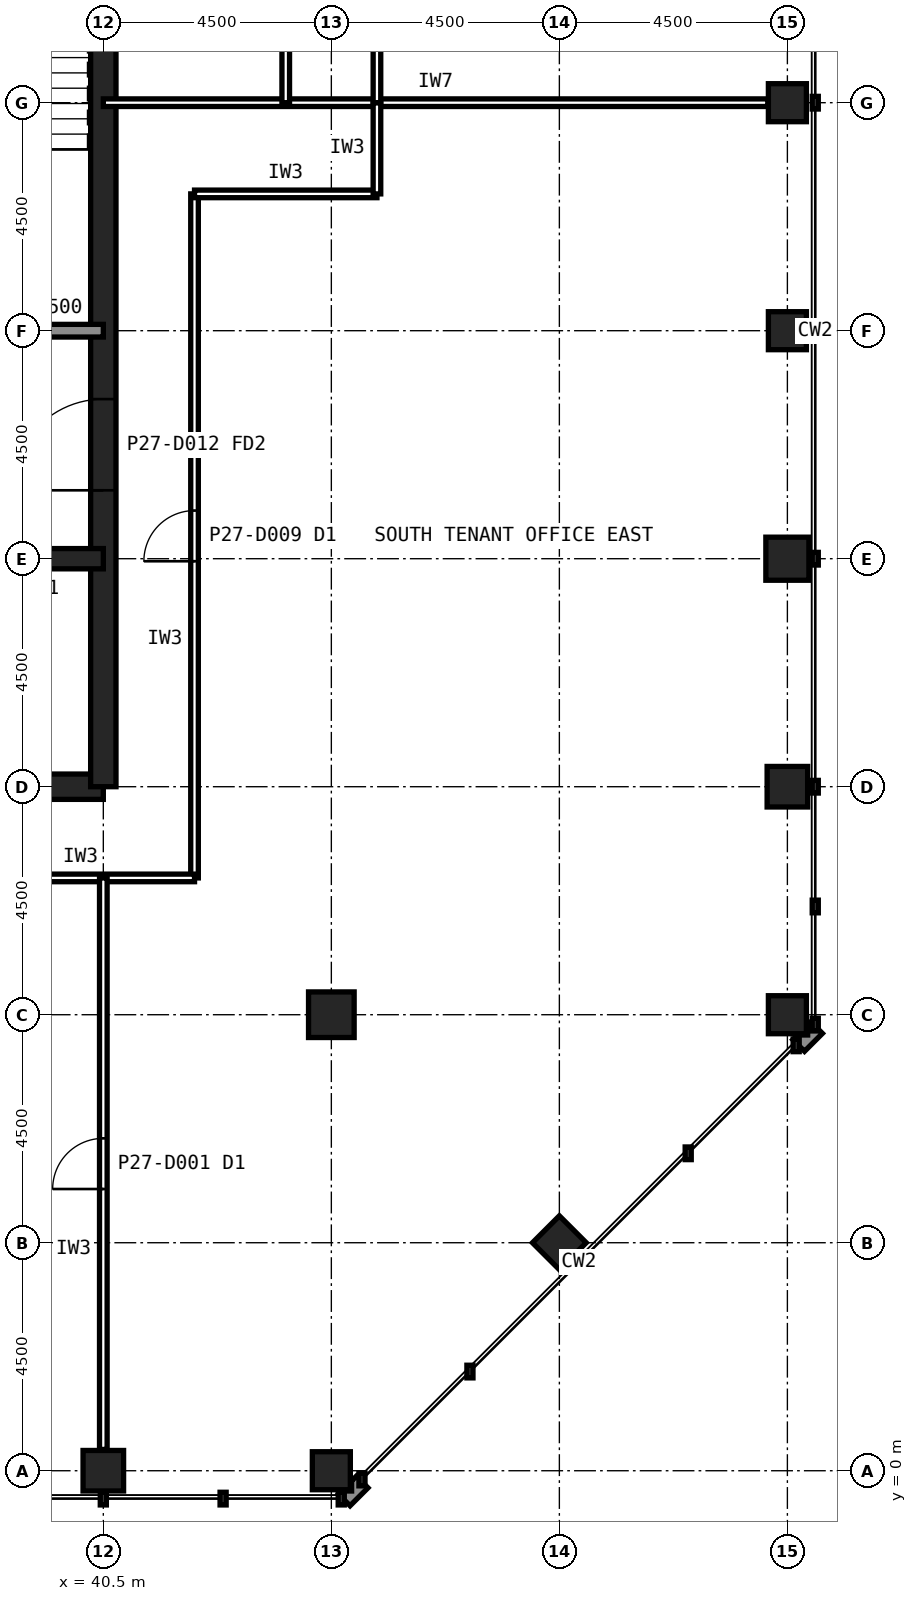
"""IFC4 building model, lengths in metres.
Left out: names, types, materials, properties, quantities, classifications, styles, units other than length and angle.
Written with IfcOpenShell. Run it as: python <this file> out.ifc"""

import sys

from ifc_helpers import new_model, si_unit, direction, frame, frame_2d, origin, origin_2d, place, context, subcontext, project, spatial, rectangle, hollow_rectangle, extrude, element, fill, save


model = new_model("IFC4")
c1 = context("Model", 3, precision=1e-05, world=origin(), true_north=direction((0.0, 1.0)))
c2 = subcontext(c1, "Body", "Model", "MODEL_VIEW")
j1 = project(units=[si_unit("LENGTHUNIT", "METRE"), si_unit("PLANEANGLEUNIT", "RADIAN")], contexts=[c1])
p1 = place(None, origin())
s1 = spatial("IfcSite", under=j1, at=p1, CompositionType="ELEMENT")
p2 = place(p1, origin())
s2 = spatial("IfcBuilding", under=s1, at=p2, CompositionType="ELEMENT")
p3 = place(p2, frame((0.0, 0.0, 119.6)))
s3 = spatial("IfcBuildingStorey", under=s2, at=p3, CompositionType="ELEMENT", Elevation=119.6)
p4 = place(p3, frame((40.5, 0.0, 0.0), z_axis=(0.0, 0.0, 1.0), x_axis=(1.0, 0.0, 0.0)))
e1 = element("IfcColumn", 1, at=p4, inside=s3, PredefinedType="COLUMN", context=c2, shape_type="SweptSolid", body=[
    extrude(hollow_rectangle(XDim=0.8, YDim=0.8, WallThickness=0.045, at=origin_2d()), origin(), (0.0, 0.0, 1.0), 4.0),
])
for number, where, z_axis, x_axis in (
    (2, (45.0, 0.0, 0.0), (0.0, 0.0, 1.0), (1.0, 0.0, 0.0)),
    (3, (54.0, 9.0, 0.0), (0.0, 0.0, 1.0), (1.0, 0.0, 0.0)),
):
    element("IfcColumn", number, at=place(p3, frame(where, z_axis=z_axis, x_axis=x_axis)), inside=s3, PredefinedType="COLUMN", context=c2, shape_type="SweptSolid", body=[
        extrude(hollow_rectangle(XDim=0.75, YDim=0.75, WallThickness=0.04, at=origin_2d()), origin(), (0.0, 0.0, 1.0), 4.0),
    ])
p5 = place(p3, frame((54.0, 13.5, 0.0), z_axis=(0.0, 0.0, 1.0), x_axis=(1.0, 0.0, 0.0)))
e4 = element("IfcColumn", 4, at=p5, inside=s3, PredefinedType="COLUMN", context=c2, shape_type="SweptSolid", body=[
    extrude(hollow_rectangle(XDim=0.8, YDim=0.8, WallThickness=0.045, at=origin_2d()), origin(), (0.0, 0.0, 1.0), 4.0),
])
p6 = place(p3, frame((54.0, 18.0, 0.0), z_axis=(0.0, 0.0, 1.0), x_axis=(1.0, 0.0, 0.0)))
e5 = element("IfcColumn", 5, at=p6, inside=s3, PredefinedType="COLUMN", context=c2, shape_type="SweptSolid", body=[
    extrude(hollow_rectangle(XDim=0.85, YDim=0.85, WallThickness=0.05, at=origin_2d()), origin(), (0.0, 0.0, 1.0), 4.0),
])
for number, where, z_axis, x_axis in (
    (6, (54.0, 22.5, 0.0), (0.0, 0.0, 1.0), (1.0, 0.0, 0.0)),
    (7, (54.0, 27.0, 0.0), (0.0, 0.0, 1.0), (1.0, 0.0, 0.0)),
    (8, (49.5, 4.5, 0.0), (0.0, 0.0, 1.0), (0.707, 0.707, 0.0)),
):
    element("IfcColumn", number, at=place(p3, frame(where, z_axis=z_axis, x_axis=x_axis)), inside=s3, PredefinedType="COLUMN", context=c2, shape_type="SweptSolid", body=[
        extrude(hollow_rectangle(XDim=0.75, YDim=0.75, WallThickness=0.04, at=origin_2d()), origin(), (0.0, 0.0, 1.0), 4.0),
    ])
p7 = place(p3, frame((45.0, 9.0, 0.0), z_axis=(0.0, 0.0, 1.0), x_axis=(1.0, 0.0, 0.0)))
e9 = element("IfcColumn", 9, at=p7, inside=s3, PredefinedType="COLUMN", context=c2, shape_type="SweptSolid", body=[
    extrude(hollow_rectangle(XDim=0.9, YDim=0.9, WallThickness=0.063, at=origin_2d()), origin(), (0.0, 0.0, 1.0), 4.0),
])
p8 = place(p3, frame((13.5, 13.5, 0.0), z_axis=(0.0, 0.0, 1.0), x_axis=(1.0, 0.0, 0.0)))
e10 = element("IfcWall", 10, at=p8, inside=s3, PredefinedType="SHEAR", context=c2, shape_type="SweptSolid", body=[
    extrude(rectangle(XDim=27.0, YDim=0.5, at=frame_2d((13.5, 0.0))), origin(), (0.0, 0.0, 1.0), 4.0),
])
p9 = place(p3, frame((40.5, 13.5, 0.0), z_axis=(0.0, 0.0, 1.0), x_axis=(0.0, 1.0, 0.0)))
e11 = element("IfcWall", 11, at=p9, inside=s3, PredefinedType="SHEAR", context=c2, shape_type="SweptSolid", body=[
    extrude(rectangle(XDim=27.0, YDim=0.5, at=frame_2d((13.5, 0.0))), origin(), (0.0, 0.0, 1.0), 4.0),
])
p10 = place(p9, frame((5.85, 0.0, 0.0)))
e12 = element("IfcOpeningElement", 12, at=p10, cuts=e11, PredefinedType="OPENING", context=c2, shape_type="SweptSolid", body=[
    extrude(rectangle(XDim=1.8, YDim=2.1, at=frame_2d((0.9, 1.05))), frame((0.0, 0.26, 0.0), z_axis=(0.0, -1.0, 0.0), x_axis=(1.0, 0.0, 0.0)), (0.0, 0.0, 1.0), 0.52),
])
p11 = place(p9, frame((19.65, 0.0, 0.0)))
e13 = element("IfcOpeningElement", 13, at=p11, cuts=e11, PredefinedType="OPENING", context=c2, shape_type="SweptSolid", body=[
    extrude(rectangle(XDim=1.2, YDim=2.1, at=frame_2d((0.6, 1.05))), frame((0.0, 0.26, 0.0), z_axis=(0.0, -1.0, 0.0), x_axis=(1.0, 0.0, 0.0)), (0.0, 0.0, 1.0), 0.52),
])
p12 = place(p3, frame((13.5, 18.0, 0.0), z_axis=(0.0, 0.0, 1.0), x_axis=(1.0, 0.0, 0.0)))
e14 = element("IfcWall", 14, at=p12, inside=s3, PredefinedType="SHEAR", context=c2, shape_type="SweptSolid", body=[
    extrude(rectangle(XDim=27.0, YDim=0.4, at=frame_2d((13.5, 0.0))), origin(), (0.0, 0.0, 1.0), 4.0),
])
p13 = place(p12, frame((24.3, 0.0, 0.0)))
e15 = element("IfcOpeningElement", 15, at=p13, cuts=e14, PredefinedType="OPENING", context=c2, shape_type="SweptSolid", body=[
    extrude(rectangle(XDim=0.9, YDim=2.1, at=frame_2d((0.45, 1.05))), frame((0.0, 0.21, 0.0), z_axis=(0.0, -1.0, 0.0), x_axis=(1.0, 0.0, 0.0)), (0.0, 0.0, 1.0), 0.42),
])
p14 = place(p12, frame((5.45, 0.0, 0.0)))
e16 = element("IfcOpeningElement", 16, at=p14, cuts=e14, PredefinedType="OPENING", context=c2, shape_type="SweptSolid", body=[
    extrude(rectangle(XDim=1.1, YDim=2.1, at=frame_2d((0.55, 1.05))), frame((0.0, 0.21, 0.0), z_axis=(0.0, -1.0, 0.0), x_axis=(1.0, 0.0, 0.0)), (0.0, 0.0, 1.0), 0.42),
])
p15 = place(p12, frame((8.45, 0.0, 0.0)))
e17 = element("IfcOpeningElement", 17, at=p15, cuts=e14, PredefinedType="OPENING", context=c2, shape_type="SweptSolid", body=[
    extrude(rectangle(XDim=1.1, YDim=2.1, at=frame_2d((0.55, 1.05))), frame((0.0, 0.21, 0.0), z_axis=(0.0, -1.0, 0.0), x_axis=(1.0, 0.0, 0.0)), (0.0, 0.0, 1.0), 0.42),
])
p16 = place(p12, frame((11.45, 0.0, 0.0)))
e18 = element("IfcOpeningElement", 18, at=p16, cuts=e14, PredefinedType="OPENING", context=c2, shape_type="SweptSolid", body=[
    extrude(rectangle(XDim=1.1, YDim=2.1, at=frame_2d((0.55, 1.05))), frame((0.0, 0.21, 0.0), z_axis=(0.0, -1.0, 0.0), x_axis=(1.0, 0.0, 0.0)), (0.0, 0.0, 1.0), 0.42),
])
p17 = place(p12, frame((14.45, 0.0, 0.0)))
e19 = element("IfcOpeningElement", 19, at=p17, cuts=e14, PredefinedType="OPENING", context=c2, shape_type="SweptSolid", body=[
    extrude(rectangle(XDim=1.1, YDim=2.1, at=frame_2d((0.55, 1.05))), frame((0.0, 0.21, 0.0), z_axis=(0.0, -1.0, 0.0), x_axis=(1.0, 0.0, 0.0)), (0.0, 0.0, 1.0), 0.42),
])
p18 = place(p12, frame((17.45, 0.0, 0.0)))
e20 = element("IfcOpeningElement", 20, at=p18, cuts=e14, PredefinedType="OPENING", context=c2, shape_type="SweptSolid", body=[
    extrude(rectangle(XDim=1.1, YDim=2.1, at=frame_2d((0.55, 1.05))), frame((0.0, 0.21, 0.0), z_axis=(0.0, -1.0, 0.0), x_axis=(1.0, 0.0, 0.0)), (0.0, 0.0, 1.0), 0.42),
])
p19 = place(p12, frame((20.45, 0.0, 0.0)))
e21 = element("IfcOpeningElement", 21, at=p19, cuts=e14, PredefinedType="OPENING", context=c2, shape_type="SweptSolid", body=[
    extrude(rectangle(XDim=1.1, YDim=2.1, at=frame_2d((0.55, 1.05))), frame((0.0, 0.21, 0.0), z_axis=(0.0, -1.0, 0.0), x_axis=(1.0, 0.0, 0.0)), (0.0, 0.0, 1.0), 0.42),
])
p20 = place(p12, frame((1.6, 0.0, 0.0)))
e22 = element("IfcOpeningElement", 22, at=p20, cuts=e14, PredefinedType="OPENING", context=c2, shape_type="SweptSolid", body=[
    extrude(rectangle(XDim=1.3, YDim=2.2, at=frame_2d((0.65, 1.1))), frame((0.0, 0.21, 0.0), z_axis=(0.0, -1.0, 0.0), x_axis=(1.0, 0.0, 0.0)), (0.0, 0.0, 1.0), 0.42),
])
p21 = place(p3, frame((13.5, 22.5, 0.0), z_axis=(0.0, 0.0, 1.0), x_axis=(1.0, 0.0, 0.0)))
e23 = element("IfcWall", 23, at=p21, inside=s3, PredefinedType="SOLIDWALL", context=c2, shape_type="SweptSolid", body=[
    extrude(rectangle(XDim=27.0, YDim=0.25, at=frame_2d((13.5, 0.0))), origin(), (0.0, 0.0, 1.0), 3.84),
])
p22 = place(p21, frame((1.65, 0.0, 0.0)))
e24 = element("IfcOpeningElement", 24, at=p22, cuts=e23, PredefinedType="OPENING", context=c2, shape_type="SweptSolid", body=[
    extrude(rectangle(XDim=1.2, YDim=2.1, at=frame_2d((0.6, 1.05))), frame((0.0, 0.135, 0.0), z_axis=(0.0, -1.0, 0.0), x_axis=(1.0, 0.0, 0.0)), (0.0, 0.0, 1.0), 0.27),
])
p23 = place(p21, frame((6.025, 0.0, 0.0)))
e25 = element("IfcOpeningElement", 25, at=p23, cuts=e23, PredefinedType="OPENING", context=c2, shape_type="SweptSolid", body=[
    extrude(rectangle(XDim=1.0, YDim=2.1, at=frame_2d((0.5, 1.05))), frame((0.0, 0.135, 0.0), z_axis=(0.0, -1.0, 0.0), x_axis=(1.0, 0.0, 0.0)), (0.0, 0.0, 1.0), 0.27),
])
p24 = place(p21, frame((10.525, 0.0, 0.0)))
e26 = element("IfcOpeningElement", 26, at=p24, cuts=e23, PredefinedType="OPENING", context=c2, shape_type="SweptSolid", body=[
    extrude(rectangle(XDim=1.0, YDim=2.1, at=frame_2d((0.5, 1.05))), frame((0.0, 0.135, 0.0), z_axis=(0.0, -1.0, 0.0), x_axis=(1.0, 0.0, 0.0)), (0.0, 0.0, 1.0), 0.27),
])
p25 = place(p21, frame((19.75, 0.0, 0.0)))
e27 = element("IfcOpeningElement", 27, at=p25, cuts=e23, PredefinedType="OPENING", context=c2, shape_type="SweptSolid", body=[
    extrude(rectangle(XDim=1.0, YDim=2.1, at=frame_2d((0.5, 1.05))), frame((0.0, 0.135, 0.0), z_axis=(0.0, -1.0, 0.0), x_axis=(1.0, 0.0, 0.0)), (0.0, 0.0, 1.0), 0.27),
])
p26 = place(p21, frame((15.05, 0.0, 0.0)))
e28 = element("IfcOpeningElement", 28, at=p26, cuts=e23, PredefinedType="OPENING", context=c2, shape_type="SweptSolid", body=[
    extrude(rectangle(XDim=1.4, YDim=2.4, at=frame_2d((0.7, 1.2))), frame((0.0, 0.135, 0.0), z_axis=(0.0, -1.0, 0.0), x_axis=(1.0, 0.0, 0.0)), (0.0, 0.0, 1.0), 0.27),
])
p27 = place(p3, frame((40.5, 27.0, 0.0), z_axis=(0.0, 0.0, 1.0), x_axis=(1.0, 0.0, 0.0)))
e29 = element("IfcWall", 29, at=p27, inside=s3, PredefinedType="PARTITIONING", context=c2, shape_type="SweptSolid", body=[
    extrude(rectangle(XDim=13.115, YDim=0.15, at=frame_2d((6.558, 0.0))), origin(), (0.0, 0.0, 1.0), 2.989),
])
p28 = place(p3, frame((42.3, 11.7, 0.0), z_axis=(0.0, 0.0, 1.0), x_axis=(0.0, 1.0, 0.0)))
e30 = element("IfcWall", 30, at=p28, inside=s3, PredefinedType="PARTITIONING", context=c2, shape_type="SweptSolid", body=[
    extrude(rectangle(XDim=13.5, YDim=0.15, at=frame_2d((6.75, 0.0))), origin(), (0.0, 0.0, 1.0), 3.84),
])
p29 = place(p28, frame((6.25, 0.0, 0.0)))
e31 = element("IfcOpeningElement", 31, at=p29, cuts=e30, PredefinedType="OPENING", context=c2, shape_type="SweptSolid", body=[
    extrude(rectangle(XDim=1.0, YDim=2.1, at=frame_2d((0.5, 1.05))), frame((0.0, 0.085, 0.0), z_axis=(0.0, -1.0, 0.0), x_axis=(1.0, 0.0, 0.0)), (0.0, 0.0, 1.0), 0.17),
])
p30 = place(p3, frame((37.8, 11.7, 0.0), z_axis=(0.0, 0.0, 1.0), x_axis=(1.0, 0.0, 0.0)))
e32 = element("IfcWall", 32, at=p30, inside=s3, PredefinedType="PARTITIONING", context=c2, shape_type="SweptSolid", body=[
    extrude(rectangle(XDim=4.5, YDim=0.15, at=frame_2d((2.25, 0.0))), origin(), (0.0, 0.0, 1.0), 3.84),
])
p31 = place(p3, frame((42.3, 25.2, 0.0), z_axis=(0.0, 0.0, 1.0), x_axis=(1.0, 0.0, 0.0)))
e33 = element("IfcWall", 33, at=p31, inside=s3, PredefinedType="PARTITIONING", context=c2, shape_type="SweptSolid", body=[
    extrude(rectangle(XDim=3.6, YDim=0.15, at=frame_2d((1.8, 0.0))), origin(), (0.0, 0.0, 1.0), 3.84),
])
p32 = place(p3, frame((45.9, 25.2, 0.0), z_axis=(0.0, 0.0, 1.0), x_axis=(0.0, 1.0, 0.0)))
e34 = element("IfcWall", 34, at=p32, inside=s3, PredefinedType="PARTITIONING", context=c2, shape_type="SweptSolid", body=[
    extrude(rectangle(XDim=1.8, YDim=0.15, at=frame_2d((0.9, 0.0))), origin(), (0.0, 0.0, 1.0), 3.84),
])
p33 = place(p3, frame((45.9, 27.0, 0.0), z_axis=(0.0, 0.0, 1.0), x_axis=(0.0, 1.0, 0.0)))
e35 = element("IfcWall", 35, at=p33, inside=s3, PredefinedType="PARTITIONING", context=c2, shape_type="SweptSolid", body=[
    extrude(rectangle(XDim=6.3, YDim=0.15, at=frame_2d((3.15, 0.0))), origin(), (0.0, 0.0, 1.0), 3.84),
])
p34 = place(p3, frame((44.1, 27.0, 0.0), z_axis=(0.0, 0.0, 1.0), x_axis=(0.0, 1.0, 0.0)))
e36 = element("IfcWall", 36, at=p34, inside=s3, PredefinedType="PARTITIONING", context=c2, shape_type="SweptSolid", body=[
    extrude(rectangle(XDim=4.5, YDim=0.15, at=frame_2d((2.25, 0.0))), origin(), (0.0, 0.0, 1.0), 3.84),
])
p35 = place(p3, frame((40.5, 0.42, 0.0), z_axis=(0.0, 0.0, 1.0), x_axis=(0.0, 1.0, 0.0)))
e37 = element("IfcWall", 37, at=p35, inside=s3, PredefinedType="PARTITIONING", context=c2, shape_type="SweptSolid", body=[
    extrude(rectangle(XDim=11.28, YDim=0.15, at=frame_2d((5.64, 0.0))), origin(), (0.0, 0.0, 1.0), 2.989),
])
p36 = place(p35, frame((5.14, 0.0, 0.0)))
e38 = element("IfcOpeningElement", 38, at=p36, cuts=e37, PredefinedType="OPENING", context=c2, shape_type="SweptSolid", body=[
    extrude(rectangle(XDim=1.0, YDim=2.1, at=frame_2d((0.5, 1.05))), frame((0.0, 0.085, 0.0), z_axis=(0.0, -1.0, 0.0), x_axis=(1.0, 0.0, 0.0)), (0.0, 0.0, 1.0), 0.17),
])
p37 = place(p10, origin())
e39 = element("IfcDoor", 39, at=p37, inside=s3, OperationType="SINGLE_SWING_LEFT", PredefinedType="DOOR", context=c2, shape_type="SweptSolid", body=[
    extrude(rectangle(XDim=1.8, YDim=2.1, at=frame_2d((0.9, 1.05))), frame((0.0, 0.025, 0.0), z_axis=(0.0, -1.0, 0.0), x_axis=(1.0, 0.0, 0.0)), (0.0, 0.0, 1.0), 0.05),
])
fill(e12, e39)
p38 = place(p29, origin())
e40 = element("IfcDoor", 40, at=p38, inside=s3, OperationType="SINGLE_SWING_LEFT", PredefinedType="DOOR", context=c2, shape_type="SweptSolid", body=[
    extrude(rectangle(XDim=1.0, YDim=2.1, at=frame_2d((0.5, 1.05))), frame((0.0, 0.025, 0.0), z_axis=(0.0, -1.0, 0.0), x_axis=(1.0, 0.0, 0.0)), (0.0, 0.0, 1.0), 0.05),
])
fill(e31, e40)
p39 = place(p36, origin())
e41 = element("IfcDoor", 41, at=p39, inside=s3, OperationType="SINGLE_SWING_LEFT", PredefinedType="DOOR", context=c2, shape_type="SweptSolid", body=[
    extrude(rectangle(XDim=1.0, YDim=2.1, at=frame_2d((0.5, 1.05))), frame((0.0, 0.025, 0.0), z_axis=(0.0, -1.0, 0.0), x_axis=(1.0, 0.0, 0.0)), (0.0, 0.0, 1.0), 0.05),
])
fill(e38, e41)
save(model, sys.argv[1])
